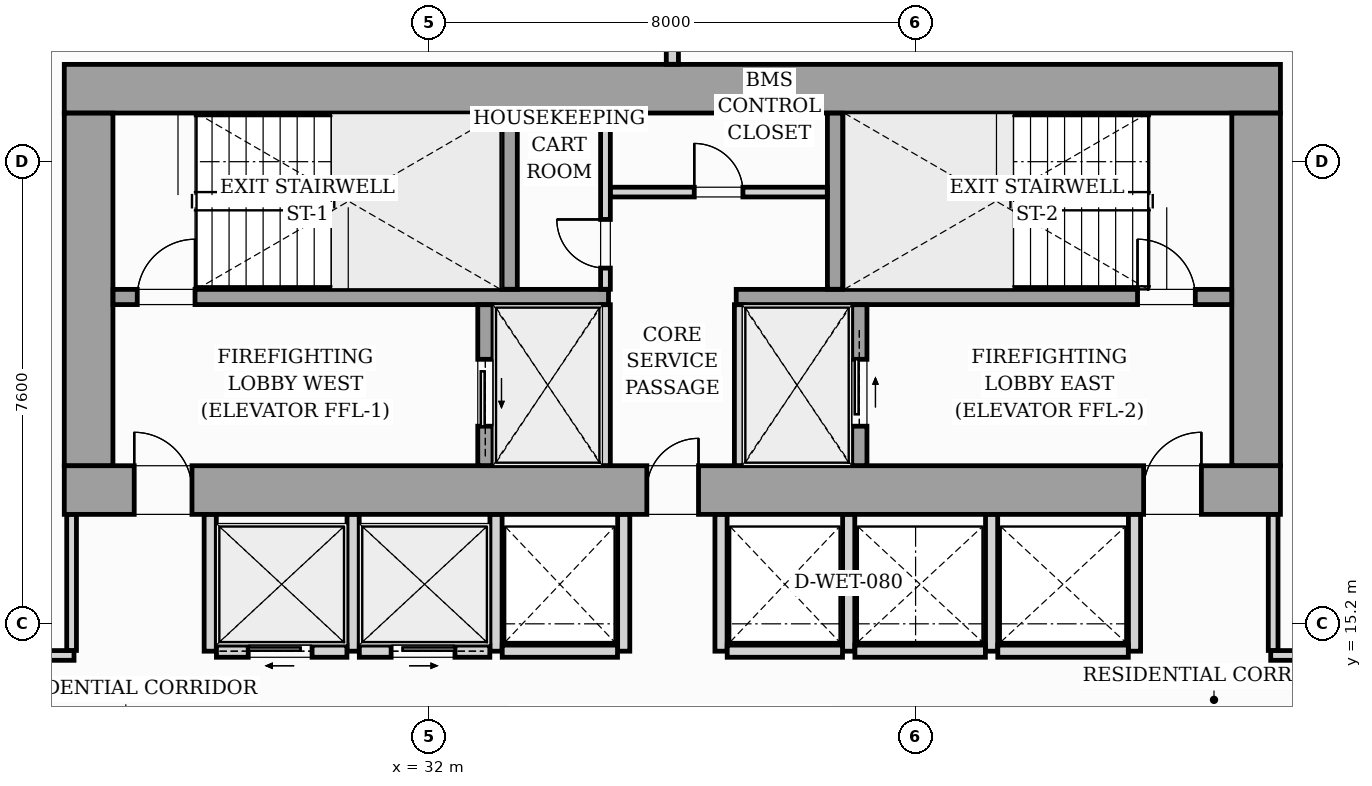
"""IFC4 building model, lengths in metres.
Left out: names, types, materials, properties, quantities, classifications, styles, units other than length and angle.
Written with IfcOpenShell. Run it as: python <this file> out.ifc"""

import sys

from ifc_helpers import new_model, si_unit, direction, frame, frame_2d, origin, origin_2d, place, context, subcontext, project, spatial, rectangle, i_section, extrude, source, transform, mapped, element, fill, save


model = new_model("IFC4")
c1 = context("Model", 3, precision=1e-05, world=origin(), true_north=direction((0.0, 1.0)))
c2 = subcontext(c1, "Body", "Model", "MODEL_VIEW")
j1 = project(units=[si_unit("LENGTHUNIT", "METRE"), si_unit("PLANEANGLEUNIT", "RADIAN")], contexts=[c1])
p1 = place(None, origin())
s1 = spatial("IfcSite", under=j1, at=p1, CompositionType="ELEMENT")
p2 = place(p1, origin())
s2 = spatial("IfcBuilding", under=s1, at=p2, CompositionType="ELEMENT")
p3 = place(p2, frame((0.0, 0.0, 61.4)))
s3 = spatial("IfcBuildingStorey", under=s2, at=p3, CompositionType="ELEMENT", Elevation=61.4)
m1 = source(origin(), c2, "Body", "SweptSolid", [
    extrude(i_section(OverallWidth=0.437, OverallDepth=0.514, WebThickness=0.061, FlangeThickness=0.097, FilletRadius=0.018, at=origin_2d()), origin(), (0.0, 0.0, 1.0), 3.196),
])
for number, where, z_axis, x_axis in (
    (1, (26.4, 17.4, 0.002), (0.0, 0.0, 1.0), (1.0, 0.0, 0.0)),
    (2, (33.12, 17.4, 0.002), (0.0, 0.0, 1.0), (1.0, 0.0, 0.0)),
    (3, (38.88, 17.4, 0.002), (0.0, 0.0, 1.0), (1.0, 0.0, 0.0)),
    (4, (45.6, 17.4, 0.002), (0.0, 0.0, 1.0), (1.0, 0.0, 0.0)),
    (5, (26.4, 24.0, 0.002), (0.0, 0.0, 1.0), (1.0, 0.0, 0.0)),
    (6, (33.12, 24.0, 0.002), (0.0, 0.0, 1.0), (1.0, 0.0, 0.0)),
    (7, (38.88, 24.0, 0.002), (0.0, 0.0, 1.0), (1.0, 0.0, 0.0)),
    (8, (45.6, 24.0, 0.002), (0.0, 0.0, 1.0), (1.0, 0.0, 0.0)),
):
    element("IfcColumn", number, at=place(p3, frame(where, z_axis=z_axis, x_axis=x_axis)), inside=s3, PredefinedType="PILASTER", context=c2, shape_type="MappedRepresentation", body=[
        mapped(m1, transform((0.0, 0.0, 0.0), scale=1.0)),
    ])
p4 = place(p3, frame((26.0, 17.4, 0.0), z_axis=(0.0, 0.0, 1.0), x_axis=(1.0, 0.0, 0.0)))
e9 = element("IfcWall", 9, at=p4, inside=s3, PredefinedType="SHEAR", context=c2, shape_type="SweptSolid", body=[
    extrude(rectangle(XDim=20.0, YDim=0.8, at=frame_2d((10.0, 0.0))), origin(), (0.0, 0.0, 1.0), 3.2),
])
p5 = place(p4, frame((1.15, 0.0, 0.0)))
e10 = element("IfcOpeningElement", 10, at=p5, cuts=e9, PredefinedType="OPENING", context=c2, shape_type="SweptSolid", body=[
    extrude(rectangle(XDim=0.95, YDim=2.06, at=frame_2d((0.475, 1.03))), frame((0.0, 0.41, 0.0), z_axis=(0.0, -1.0, 0.0), x_axis=(1.0, 0.0, 0.0)), (0.0, 0.0, 1.0), 0.82),
])
p6 = place(p4, frame((9.58, 0.0, 0.0)))
e11 = element("IfcOpeningElement", 11, at=p6, cuts=e9, PredefinedType="OPENING", context=c2, shape_type="SweptSolid", body=[
    extrude(rectangle(XDim=0.85, YDim=2.0, at=frame_2d((0.425, 1.0))), frame((0.0, 0.41, 0.0), z_axis=(0.0, -1.0, 0.0), x_axis=(1.0, 0.0, 0.0)), (0.0, 0.0, 1.0), 0.82),
])
p7 = place(p4, frame((17.75, 0.0, 0.0)))
e12 = element("IfcOpeningElement", 12, at=p7, cuts=e9, PredefinedType="OPENING", context=c2, shape_type="SweptSolid", body=[
    extrude(rectangle(XDim=0.95, YDim=2.06, at=frame_2d((0.475, 1.03))), frame((0.0, 0.41, 0.0), z_axis=(0.0, -1.0, 0.0), x_axis=(1.0, 0.0, 0.0)), (0.0, 0.0, 1.0), 0.82),
])
p8 = place(p3, frame((26.0, 24.0, 0.0), z_axis=(0.0, 0.0, 1.0), x_axis=(1.0, 0.0, 0.0)))
e13 = element("IfcWall", 13, at=p8, inside=s3, PredefinedType="SHEAR", context=c2, shape_type="SweptSolid", body=[
    extrude(rectangle(XDim=20.0, YDim=0.8, at=frame_2d((10.0, 0.0))), origin(), (0.0, 0.0, 1.0), 3.2),
])
for number, where, z_axis, x_axis in (
    (14, (26.4, 17.802, 0.0), (0.0, 0.0, 1.0), (0.0, 1.0, 0.0)),
    (15, (45.6, 17.802, 0.0), (0.0, 0.0, 1.0), (0.0, 1.0, 0.0)),
):
    element("IfcWall", number, at=place(p3, frame(where, z_axis=z_axis, x_axis=x_axis)), inside=s3, PredefinedType="SHEAR", context=c2, shape_type="SweptSolid", body=[
        extrude(rectangle(XDim=5.796, YDim=0.8, at=frame_2d((2.898, 0.0))), origin(), (0.0, 0.0, 1.0), 3.2),
    ])
p9 = place(p3, frame((26.802, 20.575, 0.0), z_axis=(0.0, 0.0, 1.0), x_axis=(1.0, 0.0, 0.0)))
e16 = element("IfcWall", 16, at=p9, inside=s3, PredefinedType="SOLIDWALL", context=c2, shape_type="SweptSolid", body=[
    extrude(rectangle(XDim=8.148, YDim=0.25, at=frame_2d((4.074, 0.0))), origin(), (0.0, 0.0, 1.0), 3.2),
])
p10 = place(p9, frame((0.398, 0.0, 0.0)))
e17 = element("IfcOpeningElement", 17, at=p10, cuts=e16, PredefinedType="OPENING", context=c2, shape_type="SweptSolid", body=[
    extrude(rectangle(XDim=0.95, YDim=2.06, at=frame_2d((0.475, 1.03))), frame((0.0, 0.135, 0.0), z_axis=(0.0, -1.0, 0.0), x_axis=(1.0, 0.0, 0.0)), (0.0, 0.0, 1.0), 0.27),
])
p11 = place(p3, frame((37.05, 20.575, 0.0), z_axis=(0.0, 0.0, 1.0), x_axis=(1.0, 0.0, 0.0)))
e18 = element("IfcWall", 18, at=p11, inside=s3, PredefinedType="SOLIDWALL", context=c2, shape_type="SweptSolid", body=[
    extrude(rectangle(XDim=8.148, YDim=0.25, at=frame_2d((4.074, 0.0))), origin(), (0.0, 0.0, 1.0), 3.2),
])
p12 = place(p11, frame((6.6, 0.0, 0.0)))
e19 = element("IfcOpeningElement", 19, at=p12, cuts=e18, PredefinedType="OPENING", context=c2, shape_type="SweptSolid", body=[
    extrude(rectangle(XDim=0.95, YDim=2.06, at=frame_2d((0.475, 1.03))), frame((0.0, 0.135, 0.0), z_axis=(0.0, -1.0, 0.0), x_axis=(1.0, 0.0, 0.0)), (0.0, 0.0, 1.0), 0.27),
])
for number, where, z_axis, x_axis in (
    (20, (33.325, 20.702, 0.0), (0.0, 0.0, 1.0), (0.0, 1.0, 0.0)),
    (21, (38.675, 20.702, 0.0), (0.0, 0.0, 1.0), (0.0, 1.0, 0.0)),
):
    element("IfcWall", number, at=place(p3, frame(where, z_axis=z_axis, x_axis=x_axis)), inside=s3, PredefinedType="SOLIDWALL", context=c2, shape_type="SweptSolid", body=[
        extrude(rectangle(XDim=2.896, YDim=0.25, at=frame_2d((1.448, 0.0))), origin(), (0.0, 0.0, 1.0), 3.2),
    ])
p13 = place(p3, frame((32.925, 17.802, 0.0), z_axis=(0.0, 0.0, 1.0), x_axis=(0.0, 1.0, 0.0)))
e22 = element("IfcWall", 22, at=p13, inside=s3, PredefinedType="SOLIDWALL", context=c2, shape_type="SweptSolid", body=[
    extrude(rectangle(XDim=2.646, YDim=0.25, at=frame_2d((1.323, 0.0))), origin(), (0.0, 0.0, 1.0), 3.2),
])
p14 = place(p13, frame((0.648, 0.0, 0.0)))
e23 = element("IfcOpeningElement", 23, at=p14, cuts=e22, PredefinedType="OPENING", context=c2, shape_type="SweptSolid", body=[
    extrude(rectangle(XDim=1.1, YDim=2.08, at=frame_2d((0.55, 1.04))), frame((0.0, 0.135, 0.0), z_axis=(0.0, -1.0, 0.0), x_axis=(1.0, 0.0, 0.0)), (0.0, 0.0, 1.0), 0.27),
])
for number, where, z_axis, x_axis in (
    (24, (34.9, 17.802, 0.0), (0.0, 0.0, 1.0), (0.0, 1.0, 0.0)),
    (25, (37.1, 17.802, 0.0), (0.0, 0.0, 1.0), (0.0, 1.0, 0.0)),
):
    element("IfcWall", number, at=place(p3, frame(where, z_axis=z_axis, x_axis=x_axis)), inside=s3, PredefinedType="PARTITIONING", context=c2, shape_type="SweptSolid", body=[
        extrude(rectangle(XDim=2.646, YDim=0.16, at=frame_2d((1.323, 0.0))), origin(), (0.0, 0.0, 1.0), 2.94),
    ])
p15 = place(p3, frame((39.075, 17.802, 0.0), z_axis=(0.0, 0.0, 1.0), x_axis=(0.0, 1.0, 0.0)))
e26 = element("IfcWall", 26, at=p15, inside=s3, PredefinedType="SOLIDWALL", context=c2, shape_type="SweptSolid", body=[
    extrude(rectangle(XDim=2.646, YDim=0.25, at=frame_2d((1.323, 0.0))), origin(), (0.0, 0.0, 1.0), 3.2),
])
p16 = place(p15, frame((0.648, 0.0, 0.0)))
e27 = element("IfcOpeningElement", 27, at=p16, cuts=e26, PredefinedType="OPENING", context=c2, shape_type="SweptSolid", body=[
    extrude(rectangle(XDim=1.1, YDim=2.08, at=frame_2d((0.55, 1.04))), frame((0.0, 0.135, 0.0), z_axis=(0.0, -1.0, 0.0), x_axis=(1.0, 0.0, 0.0)), (0.0, 0.0, 1.0), 0.27),
])
p17 = place(p3, frame((34.9, 20.702, 0.0), z_axis=(0.0, 0.0, 1.0), x_axis=(0.0, 1.0, 0.0)))
e28 = element("IfcWall", 28, at=p17, inside=s3, PredefinedType="PARTITIONING", context=c2, shape_type="SweptSolid", body=[
    extrude(rectangle(XDim=2.896, YDim=0.16, at=frame_2d((1.448, 0.0))), origin(), (0.0, 0.0, 1.0), 2.94),
])
p18 = place(p17, frame((0.348, 0.0, 0.0)))
e29 = element("IfcOpeningElement", 29, at=p18, cuts=e28, PredefinedType="OPENING", context=c2, shape_type="SweptSolid", body=[
    extrude(rectangle(XDim=0.8, YDim=2.05, at=frame_2d((0.4, 1.025))), frame((0.0, 0.09, 0.0), z_axis=(0.0, -1.0, 0.0), x_axis=(1.0, 0.0, 0.0)), (0.0, 0.0, 1.0), 0.18),
])
p19 = place(p3, frame((34.982, 22.3, 0.0), z_axis=(0.0, 0.0, 1.0), x_axis=(1.0, 0.0, 0.0)))
e30 = element("IfcWall", 30, at=p19, inside=s3, PredefinedType="PARTITIONING", context=c2, shape_type="SweptSolid", body=[
    extrude(rectangle(XDim=3.566, YDim=0.16, at=frame_2d((1.783, 0.0))), origin(), (0.0, 0.0, 1.0), 2.94),
])
p20 = place(p19, frame((1.378, 0.0, 0.0)))
e31 = element("IfcOpeningElement", 31, at=p20, cuts=e30, PredefinedType="OPENING", context=c2, shape_type="SweptSolid", body=[
    extrude(rectangle(XDim=0.8, YDim=2.05, at=frame_2d((0.4, 1.025))), frame((0.0, 0.09, 0.0), z_axis=(0.0, -1.0, 0.0), x_axis=(1.0, 0.0, 0.0)), (0.0, 0.0, 1.0), 0.18),
])
for number, where, z_axis, x_axis in (
    (32, (28.4, 14.75, 0.0), (0.0, 0.0, 1.0), (0.0, 1.0, 0.0)),
    (33, (30.75, 14.75, 0.0), (0.0, 0.0, 1.0), (0.0, 1.0, 0.0)),
    (34, (33.1, 14.75, 0.0), (0.0, 0.0, 1.0), (0.0, 1.0, 0.0)),
):
    element("IfcWall", number, at=place(p3, frame(where, z_axis=z_axis, x_axis=x_axis)), inside=s3, PredefinedType="PARTITIONING", context=c2, shape_type="SweptSolid", body=[
        extrude(rectangle(XDim=2.248, YDim=0.2, at=frame_2d((1.124, 0.0))), origin(), (0.0, 0.0, 1.0), 2.94),
    ])
p21 = place(p3, frame((28.502, 14.75, 0.0), z_axis=(0.0, 0.0, 1.0), x_axis=(1.0, 0.0, 0.0)))
e35 = element("IfcWall", 35, at=p21, inside=s3, PredefinedType="PARTITIONING", context=c2, shape_type="SweptSolid", body=[
    extrude(rectangle(XDim=2.146, YDim=0.2, at=frame_2d((1.073, 0.0))), origin(), (0.0, 0.0, 1.0), 2.94),
])
p22 = place(p21, frame((0.523, 0.0, 0.0)))
e36 = element("IfcOpeningElement", 36, at=p22, cuts=e35, PredefinedType="OPENING", context=c2, shape_type="SweptSolid", body=[
    extrude(rectangle(XDim=1.05, YDim=2.08, at=frame_2d((0.525, 1.04))), frame((0.0, 0.11, 0.0), z_axis=(0.0, -1.0, 0.0), x_axis=(1.0, 0.0, 0.0)), (0.0, 0.0, 1.0), 0.22),
])
p23 = place(p3, frame((30.852, 14.75, 0.0), z_axis=(0.0, 0.0, 1.0), x_axis=(1.0, 0.0, 0.0)))
e37 = element("IfcWall", 37, at=p23, inside=s3, PredefinedType="PARTITIONING", context=c2, shape_type="SweptSolid", body=[
    extrude(rectangle(XDim=2.146, YDim=0.2, at=frame_2d((1.073, 0.0))), origin(), (0.0, 0.0, 1.0), 2.94),
])
p24 = place(p23, frame((0.523, 0.0, 0.0)))
e38 = element("IfcOpeningElement", 38, at=p24, cuts=e37, PredefinedType="OPENING", context=c2, shape_type="SweptSolid", body=[
    extrude(rectangle(XDim=1.05, YDim=2.08, at=frame_2d((0.525, 1.04))), frame((0.0, 0.11, 0.0), z_axis=(0.0, -1.0, 0.0), x_axis=(1.0, 0.0, 0.0)), (0.0, 0.0, 1.0), 0.22),
])
p25 = place(p3, frame((35.2, 14.75, 0.0), z_axis=(0.0, 0.0, 1.0), x_axis=(0.0, 1.0, 0.0)))
e39 = element("IfcWall", 39, at=p25, inside=s3, PredefinedType="PARTITIONING", context=c2, shape_type="SweptSolid", body=[
    extrude(rectangle(XDim=2.248, YDim=0.2, at=frame_2d((1.124, 0.0))), origin(), (0.0, 0.0, 1.0), 2.94),
])
p26 = place(p3, frame((33.202, 14.75, 0.0), z_axis=(0.0, 0.0, 1.0), x_axis=(1.0, 0.0, 0.0)))
e40 = element("IfcWall", 40, at=p26, inside=s3, PredefinedType="PARTITIONING", context=c2, shape_type="SweptSolid", body=[
    extrude(rectangle(XDim=1.896, YDim=0.2, at=frame_2d((0.948, 0.0))), origin(), (0.0, 0.0, 1.0), 2.94),
])
for number, where, z_axis, x_axis in (
    (41, (36.8, 14.75, 0.0), (0.0, 0.0, 1.0), (0.0, 1.0, 0.0)),
    (42, (38.9, 14.75, 0.0), (0.0, 0.0, 1.0), (0.0, 1.0, 0.0)),
):
    element("IfcWall", number, at=place(p3, frame(where, z_axis=z_axis, x_axis=x_axis)), inside=s3, PredefinedType="PARTITIONING", context=c2, shape_type="SweptSolid", body=[
        extrude(rectangle(XDim=2.248, YDim=0.2, at=frame_2d((1.124, 0.0))), origin(), (0.0, 0.0, 1.0), 2.94),
    ])
p27 = place(p3, frame((36.902, 14.75, 0.0), z_axis=(0.0, 0.0, 1.0), x_axis=(1.0, 0.0, 0.0)))
e43 = element("IfcWall", 43, at=p27, inside=s3, PredefinedType="PARTITIONING", context=c2, shape_type="SweptSolid", body=[
    extrude(rectangle(XDim=1.896, YDim=0.2, at=frame_2d((0.948, 0.0))), origin(), (0.0, 0.0, 1.0), 2.94),
])
for number, where, z_axis, x_axis in (
    (44, (41.25, 14.75, 0.0), (0.0, 0.0, 1.0), (0.0, 1.0, 0.0)),
    (45, (43.6, 14.75, 0.0), (0.0, 0.0, 1.0), (0.0, 1.0, 0.0)),
):
    element("IfcWall", number, at=place(p3, frame(where, z_axis=z_axis, x_axis=x_axis)), inside=s3, PredefinedType="PARTITIONING", context=c2, shape_type="SweptSolid", body=[
        extrude(rectangle(XDim=2.248, YDim=0.2, at=frame_2d((1.124, 0.0))), origin(), (0.0, 0.0, 1.0), 2.94),
    ])
for number, where, z_axis, x_axis in (
    (46, (39.002, 14.75, 0.0), (0.0, 0.0, 1.0), (1.0, 0.0, 0.0)),
    (47, (41.352, 14.75, 0.0), (0.0, 0.0, 1.0), (1.0, 0.0, 0.0)),
):
    element("IfcWall", number, at=place(p3, frame(where, z_axis=z_axis, x_axis=x_axis)), inside=s3, PredefinedType="PARTITIONING", context=c2, shape_type="SweptSolid", body=[
        extrude(rectangle(XDim=2.146, YDim=0.2, at=frame_2d((1.073, 0.0))), origin(), (0.0, 0.0, 1.0), 2.94),
    ])
p28 = place(p3, frame((36.0, 24.402, 0.0), z_axis=(0.0, 0.0, 1.0), x_axis=(0.0, 1.0, 0.0)))
e48 = element("IfcWall", 48, at=p28, inside=s3, PredefinedType="PARTITIONING", context=c2, shape_type="SweptSolid", body=[
    extrude(rectangle(XDim=3.218, YDim=0.2, at=frame_2d((1.609, 0.0))), origin(), (0.0, 0.0, 1.0), 2.94),
])
p29 = place(p3, frame((17.232, 14.68, 0.0), z_axis=(0.0, 0.0, 1.0), x_axis=(1.0, 0.0, 0.0)))
e49 = element("IfcWall", 49, at=p29, inside=s3, PredefinedType="PARTITIONING", context=c2, shape_type="SweptSolid", body=[
    extrude(rectangle(XDim=8.928, YDim=0.16, at=frame_2d((4.464, 0.0))), origin(), (0.0, 0.0, 1.0), 2.94),
])
p30 = place(p29, frame((3.888, 0.0, 0.0)))
e50 = element("IfcOpeningElement", 50, at=p30, cuts=e49, PredefinedType="OPENING", context=c2, shape_type="SweptSolid", body=[
    extrude(rectangle(XDim=0.95, YDim=2.06, at=frame_2d((0.475, 1.03))), frame((0.0, 0.09, 0.0), z_axis=(0.0, -1.0, 0.0), x_axis=(1.0, 0.0, 0.0)), (0.0, 0.0, 1.0), 0.18),
])
p31 = place(p3, frame((26.12, 14.762, 0.0), z_axis=(0.0, 0.0, 1.0), x_axis=(0.0, 1.0, 0.0)))
e51 = element("IfcWall", 51, at=p31, inside=s3, PredefinedType="PARTITIONING", context=c2, shape_type="SweptSolid", body=[
    extrude(rectangle(XDim=2.236, YDim=0.16, at=frame_2d((1.118, 0.0))), origin(), (0.0, 0.0, 1.0), 2.94),
])
p32 = place(p3, frame((45.84, 14.68, 0.0), z_axis=(0.0, 0.0, 1.0), x_axis=(1.0, 0.0, 0.0)))
e52 = element("IfcWall", 52, at=p32, inside=s3, PredefinedType="PARTITIONING", context=c2, shape_type="SweptSolid", body=[
    extrude(rectangle(XDim=4.428, YDim=0.16, at=frame_2d((2.214, 0.0))), origin(), (0.0, 0.0, 1.0), 2.94),
])
p33 = place(p32, frame((1.84, 0.0, 0.0)))
e53 = element("IfcOpeningElement", 53, at=p33, cuts=e52, PredefinedType="OPENING", context=c2, shape_type="SweptSolid", body=[
    extrude(rectangle(XDim=0.95, YDim=2.06, at=frame_2d((0.475, 1.03))), frame((0.0, 0.09, 0.0), z_axis=(0.0, -1.0, 0.0), x_axis=(1.0, 0.0, 0.0)), (0.0, 0.0, 1.0), 0.18),
])
p34 = place(p3, frame((45.88, 14.762, 0.0), z_axis=(0.0, 0.0, 1.0), x_axis=(0.0, 1.0, 0.0)))
e54 = element("IfcWall", 54, at=p34, inside=s3, PredefinedType="PARTITIONING", context=c2, shape_type="SweptSolid", body=[
    extrude(rectangle(XDim=2.236, YDim=0.16, at=frame_2d((1.118, 0.0))), origin(), (0.0, 0.0, 1.0), 2.94),
])
m2 = source(origin(), c2, "Body", "SweptSolid", [
    extrude(rectangle(XDim=0.95, YDim=2.06, at=frame_2d((0.475, 1.03))), frame((0.0, 0.025, 0.0), z_axis=(0.0, -1.0, 0.0), x_axis=(1.0, 0.0, 0.0)), (0.0, 0.0, 1.0), 0.05),
])
p35 = place(p5, origin())
e55 = element("IfcDoor", 55, at=p35, inside=s3, OperationType="SINGLE_SWING_LEFT", PredefinedType="DOOR", context=c2, shape_type="MappedRepresentation", body=[
    mapped(m2, transform((0.0, 0.0, 0.0), scale=1.0)),
])
fill(e10, e55)
m3 = source(origin(), c2, "Body", "SweptSolid", [
    extrude(rectangle(XDim=0.85, YDim=2.0, at=frame_2d((0.425, 1.0))), frame((0.0, 0.025, 0.0), z_axis=(0.0, -1.0, 0.0), x_axis=(1.0, 0.0, 0.0)), (0.0, 0.0, 1.0), 0.05),
])
p36 = place(p6, origin())
e56 = element("IfcDoor", 56, at=p36, inside=s3, OperationType="SINGLE_SWING_RIGHT", PredefinedType="DOOR", context=c2, shape_type="MappedRepresentation", body=[
    mapped(m3, transform((0.0, 0.0, 0.0), scale=1.0)),
])
fill(e11, e56)
p37 = place(p7, origin())
e57 = element("IfcDoor", 57, at=p37, inside=s3, OperationType="SINGLE_SWING_RIGHT", PredefinedType="DOOR", context=c2, shape_type="MappedRepresentation", body=[
    mapped(m2, transform((0.0, 0.0, 0.0), scale=1.0)),
])
fill(e12, e57)
p38 = place(p10, origin())
e58 = element("IfcDoor", 58, at=p38, inside=s3, OperationType="SINGLE_SWING_RIGHT", PredefinedType="DOOR", context=c2, shape_type="MappedRepresentation", body=[
    mapped(m2, transform((0.0, 0.0, 0.0), scale=1.0)),
])
fill(e17, e58)
p39 = place(p12, origin())
e59 = element("IfcDoor", 59, at=p39, inside=s3, OperationType="SINGLE_SWING_LEFT", PredefinedType="DOOR", context=c2, shape_type="MappedRepresentation", body=[
    mapped(m2, transform((0.0, 0.0, 0.0), scale=1.0)),
])
fill(e19, e59)
m4 = source(origin(), c2, "Body", "SweptSolid", [
    extrude(rectangle(XDim=1.1, YDim=2.08, at=frame_2d((0.55, 1.04))), frame((0.0, 0.025, 0.0), z_axis=(0.0, -1.0, 0.0), x_axis=(1.0, 0.0, 0.0)), (0.0, 0.0, 1.0), 0.05),
])
p40 = place(p14, origin())
e60 = element("IfcDoor", 60, at=p40, inside=s3, OperationType="SLIDING_TO_LEFT", PredefinedType="DOOR", context=c2, shape_type="MappedRepresentation", body=[
    mapped(m4, transform((0.0, 0.0, 0.0), scale=1.0)),
])
fill(e23, e60)
p41 = place(p16, origin())
e61 = element("IfcDoor", 61, at=p41, inside=s3, OperationType="SLIDING_TO_RIGHT", PredefinedType="DOOR", context=c2, shape_type="MappedRepresentation", body=[
    mapped(m4, transform((0.0, 0.0, 0.0), scale=1.0)),
])
fill(e27, e61)
m5 = source(origin(), c2, "Body", "SweptSolid", [
    extrude(rectangle(XDim=0.8, YDim=2.05, at=frame_2d((0.4, 1.025))), frame((0.0, 0.025, 0.0), z_axis=(0.0, -1.0, 0.0), x_axis=(1.0, 0.0, 0.0)), (0.0, 0.0, 1.0), 0.05),
])
p42 = place(p18, origin())
e62 = element("IfcDoor", 62, at=p42, inside=s3, OperationType="SINGLE_SWING_RIGHT", PredefinedType="DOOR", context=c2, shape_type="MappedRepresentation", body=[
    mapped(m5, transform((0.0, 0.0, 0.0), scale=1.0)),
])
fill(e29, e62)
p43 = place(p20, origin())
e63 = element("IfcDoor", 63, at=p43, inside=s3, OperationType="SINGLE_SWING_LEFT", PredefinedType="DOOR", context=c2, shape_type="MappedRepresentation", body=[
    mapped(m5, transform((0.0, 0.0, 0.0), scale=1.0)),
])
fill(e31, e63)
m6 = source(origin(), c2, "Body", "SweptSolid", [
    extrude(rectangle(XDim=1.05, YDim=2.08, at=frame_2d((0.525, 1.04))), frame((0.0, 0.025, 0.0), z_axis=(0.0, -1.0, 0.0), x_axis=(1.0, 0.0, 0.0)), (0.0, 0.0, 1.0), 0.05),
])
p44 = place(p22, origin())
e64 = element("IfcDoor", 64, at=p44, inside=s3, OperationType="SLIDING_TO_LEFT", PredefinedType="DOOR", context=c2, shape_type="MappedRepresentation", body=[
    mapped(m6, transform((0.0, 0.0, 0.0), scale=1.0)),
])
fill(e36, e64)
p45 = place(p24, origin())
e65 = element("IfcDoor", 65, at=p45, inside=s3, OperationType="SLIDING_TO_RIGHT", PredefinedType="DOOR", context=c2, shape_type="MappedRepresentation", body=[
    mapped(m6, transform((0.0, 0.0, 0.0), scale=1.0)),
])
fill(e38, e65)
save(model, sys.argv[1])
